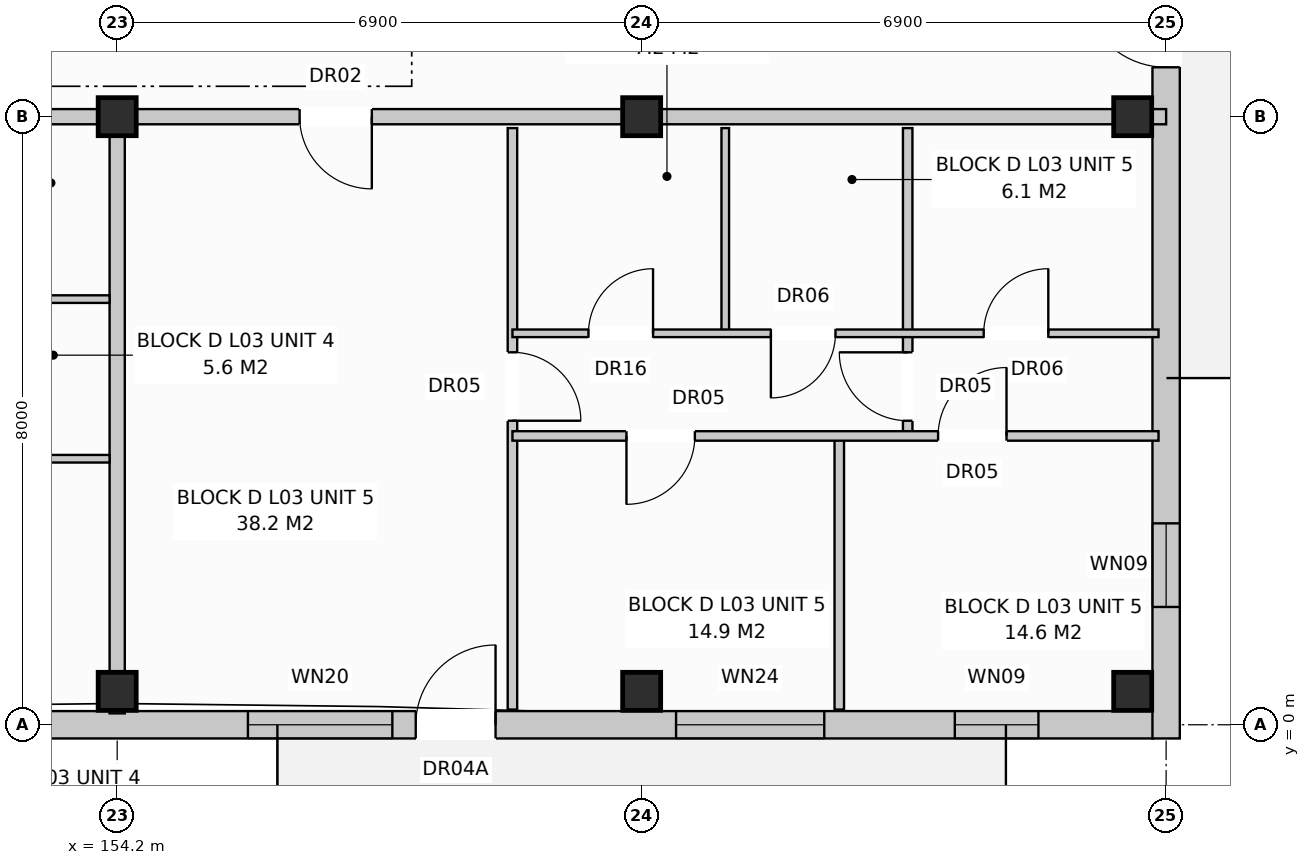
"""IFC4 building model, lengths in metres.
Left out: names, types, materials, properties, quantities, classifications, styles, units other than length and angle.
Written with IfcOpenShell. Run it as: python <this file> out.ifc"""

import sys

from ifc_helpers import new_model, si_unit, direction, frame, frame_2d, origin, origin_with_axes, origin_2d, place, context, subcontext, project, spatial, rectangle, extrude, element, fill, save


model = new_model("IFC4")
c1 = context("Model", 3, precision=1e-05, world=origin(), true_north=direction((0.0, 1.0)))
c2 = subcontext(c1, "Body", "Model", "MODEL_VIEW")
j1 = project(units=[si_unit("LENGTHUNIT", "METRE"), si_unit("PLANEANGLEUNIT", "RADIAN")], contexts=[c1])
p1 = place(None, origin())
s1 = spatial("IfcSite", under=j1, at=p1, CompositionType="ELEMENT")
p2 = place(p1, origin())
s2 = spatial("IfcBuilding", under=s1, at=p2, CompositionType="ELEMENT")
p3 = place(p2, frame((0.0, 0.0, 11.2)))
s3 = spatial("IfcBuildingStorey", under=s2, at=p3, CompositionType="ELEMENT", Elevation=11.2)
for number, where, z_axis, x_axis in (
    (1, (154.2, 0.44, 0.0), (0.0, 0.0, 1.0), (1.0, 0.0, 0.0)),
    (2, (154.2, 8.0, 0.0), (0.0, 0.0, 1.0), (1.0, 0.0, 0.0)),
    (3, (161.1, 0.44, 0.0), (0.0, 0.0, 1.0), (1.0, 0.0, 0.0)),
    (4, (161.1, 8.0, 0.0), (0.0, 0.0, 1.0), (1.0, 0.0, 0.0)),
    (5, (167.56, 0.44, 0.0), (0.0, 0.0, 1.0), (1.0, 0.0, 0.0)),
    (6, (167.56, 8.0, 0.0), (0.0, 0.0, 1.0), (1.0, 0.0, 0.0)),
):
    element("IfcColumn", number, at=place(p3, frame(where, z_axis=z_axis, x_axis=x_axis)), inside=s3, PredefinedType="COLUMN", context=c2, shape_type="SweptSolid", body=[
        extrude(rectangle(XDim=0.5, YDim=0.5, at=origin_2d()), origin(), (0.0, 0.0, 1.0), 3.2),
    ])
p4 = place(p3, frame((112.97, 0.0, 0.0), z_axis=(0.0, 0.0, 1.0), x_axis=(1.0, 0.0, 0.0)))
e7 = element("IfcWall", 7, at=p4, inside=s3, PredefinedType="STANDARD", context=c2, shape_type="SweptSolid", body=[
    extrude(rectangle(XDim=54.86, YDim=0.36, at=frame_2d((27.43, 0.0))), origin(), (0.0, 0.0, 1.0), 2.94),
])
p5 = place(p4, frame((3.764, 0.0, 0.0)))
e8 = element("IfcOpeningElement", 8, at=p5, cuts=e7, PredefinedType="OPENING", context=c2, shape_type="SweptSolid", body=[
    extrude(rectangle(XDim=1.05, YDim=2.12, at=frame_2d((0.525, 1.06))), frame((0.0, 0.192, 0.0), z_axis=(0.0, -1.0, 0.0), x_axis=(1.0, 0.0, 0.0)), (0.0, 0.0, 1.0), 0.384),
])
p6 = place(p4, frame((16.558, 0.0, 0.0)))
e9 = element("IfcOpeningElement", 9, at=p6, cuts=e7, PredefinedType="OPENING", context=c2, shape_type="SweptSolid", body=[
    extrude(rectangle(XDim=1.05, YDim=2.12, at=frame_2d((0.525, 1.06))), frame((0.0, 0.192, 0.0), z_axis=(0.0, -1.0, 0.0), x_axis=(1.0, 0.0, 0.0)), (0.0, 0.0, 1.0), 0.384),
])
p7 = place(p4, frame((30.058, 0.0, 0.0)))
e10 = element("IfcOpeningElement", 10, at=p7, cuts=e7, PredefinedType="OPENING", context=c2, shape_type="SweptSolid", body=[
    extrude(rectangle(XDim=1.05, YDim=2.12, at=frame_2d((0.525, 1.06))), frame((0.0, 0.192, 0.0), z_axis=(0.0, -1.0, 0.0), x_axis=(1.0, 0.0, 0.0)), (0.0, 0.0, 1.0), 0.384),
])
p8 = place(p4, frame((45.158, 0.0, 0.0)))
e11 = element("IfcOpeningElement", 11, at=p8, cuts=e7, PredefinedType="OPENING", context=c2, shape_type="SweptSolid", body=[
    extrude(rectangle(XDim=1.05, YDim=2.12, at=frame_2d((0.525, 1.06))), frame((0.0, 0.192, 0.0), z_axis=(0.0, -1.0, 0.0), x_axis=(1.0, 0.0, 0.0)), (0.0, 0.0, 1.0), 0.384),
])
p9 = place(p4, frame((1.6, 0.0, 0.8)))
e12 = element("IfcOpeningElement", 12, at=p9, cuts=e7, PredefinedType="OPENING", context=c2, shape_type="SweptSolid", body=[
    extrude(rectangle(XDim=1.8, YDim=1.7, at=frame_2d((0.9, 0.85))), frame((0.0, 0.192, 0.0), z_axis=(0.0, -1.0, 0.0), x_axis=(1.0, 0.0, 0.0)), (0.0, 0.0, 1.0), 0.384),
])
p10 = place(p4, frame((7.65, 0.0, 0.72)))
e13 = element("IfcOpeningElement", 13, at=p10, cuts=e7, PredefinedType="OPENING", context=c2, shape_type="SweptSolid", body=[
    extrude(rectangle(XDim=1.1, YDim=1.5, at=frame_2d((0.55, 0.75))), frame((0.0, 0.192, 0.0), z_axis=(0.0, -1.0, 0.0), x_axis=(1.0, 0.0, 0.0)), (0.0, 0.0, 1.0), 0.384),
])
p11 = place(p4, frame((10.425, 0.0, 0.8)))
e14 = element("IfcOpeningElement", 14, at=p11, cuts=e7, PredefinedType="OPENING", context=c2, shape_type="SweptSolid", body=[
    extrude(rectangle(XDim=1.95, YDim=1.65, at=frame_2d((0.975, 0.825))), frame((0.0, 0.192, 0.0), z_axis=(0.0, -1.0, 0.0), x_axis=(1.0, 0.0, 0.0)), (0.0, 0.0, 1.0), 0.384),
])
p12 = place(p4, frame((14.85, 0.0, 0.72)))
e15 = element("IfcOpeningElement", 15, at=p12, cuts=e7, PredefinedType="OPENING", context=c2, shape_type="SweptSolid", body=[
    extrude(rectangle(XDim=1.1, YDim=1.5, at=frame_2d((0.55, 0.75))), frame((0.0, 0.192, 0.0), z_axis=(0.0, -1.0, 0.0), x_axis=(1.0, 0.0, 0.0)), (0.0, 0.0, 1.0), 0.384),
])
p13 = place(p4, frame((18.15, 0.0, 0.72)))
e16 = element("IfcOpeningElement", 16, at=p13, cuts=e7, PredefinedType="OPENING", context=c2, shape_type="SweptSolid", body=[
    extrude(rectangle(XDim=1.9, YDim=1.85, at=frame_2d((0.95, 0.925))), frame((0.0, 0.192, 0.0), z_axis=(0.0, -1.0, 0.0), x_axis=(1.0, 0.0, 0.0)), (0.0, 0.0, 1.0), 0.384),
])
p14 = place(p4, frame((24.25, 0.0, 0.72)))
e17 = element("IfcOpeningElement", 17, at=p14, cuts=e7, PredefinedType="OPENING", context=c2, shape_type="SweptSolid", body=[
    extrude(rectangle(XDim=1.1, YDim=1.5, at=frame_2d((0.55, 0.75))), frame((0.0, 0.192, 0.0), z_axis=(0.0, -1.0, 0.0), x_axis=(1.0, 0.0, 0.0)), (0.0, 0.0, 1.0), 0.384),
])
p15 = place(p4, frame((28.35, 0.0, 0.72)))
e18 = element("IfcOpeningElement", 18, at=p15, cuts=e7, PredefinedType="OPENING", context=c2, shape_type="SweptSolid", body=[
    extrude(rectangle(XDim=1.1, YDim=1.5, at=frame_2d((0.55, 0.75))), frame((0.0, 0.192, 0.0), z_axis=(0.0, -1.0, 0.0), x_axis=(1.0, 0.0, 0.0)), (0.0, 0.0, 1.0), 0.384),
])
p16 = place(p4, frame((31.85, 0.0, 0.72)))
e19 = element("IfcOpeningElement", 19, at=p16, cuts=e7, PredefinedType="OPENING", context=c2, shape_type="SweptSolid", body=[
    extrude(rectangle(XDim=1.9, YDim=1.85, at=frame_2d((0.95, 0.925))), frame((0.0, 0.192, 0.0), z_axis=(0.0, -1.0, 0.0), x_axis=(1.0, 0.0, 0.0)), (0.0, 0.0, 1.0), 0.384),
])
p17 = place(p4, frame((35.325, 0.0, 0.8)))
e20 = element("IfcOpeningElement", 20, at=p17, cuts=e7, PredefinedType="OPENING", context=c2, shape_type="SweptSolid", body=[
    extrude(rectangle(XDim=1.95, YDim=1.65, at=frame_2d((0.975, 0.825))), frame((0.0, 0.192, 0.0), z_axis=(0.0, -1.0, 0.0), x_axis=(1.0, 0.0, 0.0)), (0.0, 0.0, 1.0), 0.384),
])
p18 = place(p4, frame((39.15, 0.0, 0.72)))
e21 = element("IfcOpeningElement", 21, at=p18, cuts=e7, PredefinedType="OPENING", context=c2, shape_type="SweptSolid", body=[
    extrude(rectangle(XDim=1.1, YDim=1.5, at=frame_2d((0.55, 0.75))), frame((0.0, 0.192, 0.0), z_axis=(0.0, -1.0, 0.0), x_axis=(1.0, 0.0, 0.0)), (0.0, 0.0, 1.0), 0.384),
])
p19 = place(p4, frame((42.95, 0.0, 0.8)))
e22 = element("IfcOpeningElement", 22, at=p19, cuts=e7, PredefinedType="OPENING", context=c2, shape_type="SweptSolid", body=[
    extrude(rectangle(XDim=1.9, YDim=1.85, at=frame_2d((0.95, 0.925))), frame((0.0, 0.192, 0.0), z_axis=(0.0, -1.0, 0.0), x_axis=(1.0, 0.0, 0.0)), (0.0, 0.0, 1.0), 0.384),
])
p20 = place(p4, frame((48.583, 0.0, 0.8)))
e23 = element("IfcOpeningElement", 23, at=p20, cuts=e7, PredefinedType="OPENING", context=c2, shape_type="SweptSolid", body=[
    extrude(rectangle(XDim=1.95, YDim=1.65, at=frame_2d((0.975, 0.825))), frame((0.0, 0.192, 0.0), z_axis=(0.0, -1.0, 0.0), x_axis=(1.0, 0.0, 0.0)), (0.0, 0.0, 1.0), 0.384),
])
p21 = place(p4, frame((52.25, 0.0, 0.72)))
e24 = element("IfcOpeningElement", 24, at=p21, cuts=e7, PredefinedType="OPENING", context=c2, shape_type="SweptSolid", body=[
    extrude(rectangle(XDim=1.1, YDim=1.5, at=frame_2d((0.55, 0.75))), frame((0.0, 0.192, 0.0), z_axis=(0.0, -1.0, 0.0), x_axis=(1.0, 0.0, 0.0)), (0.0, 0.0, 1.0), 0.384),
])
p22 = place(p3, frame((168.0, -0.18, 0.0), z_axis=(0.0, 0.0, 1.0), x_axis=(0.0, 1.0, 0.0)))
e25 = element("IfcWall", 25, at=p22, inside=s3, PredefinedType="STANDARD", context=c2, shape_type="SweptSolid", body=[
    extrude(rectangle(XDim=18.76, YDim=0.36, at=frame_2d((9.38, 0.0))), origin(), (0.0, 0.0, 1.0), 2.94),
])
p23 = place(p22, frame((8.83, 0.0, 0.0)))
e26 = element("IfcOpeningElement", 26, at=p23, cuts=e25, PredefinedType="OPENING", context=c2, shape_type="SweptSolid", body=[
    extrude(rectangle(XDim=1.1, YDim=2.1, at=frame_2d((0.55, 1.05))), frame((0.0, 0.192, 0.0), z_axis=(0.0, -1.0, 0.0), x_axis=(1.0, 0.0, 0.0)), (0.0, 0.0, 1.0), 0.384),
])
p24 = place(p22, frame((1.73, 0.0, 0.72)))
e27 = element("IfcOpeningElement", 27, at=p24, cuts=e25, PredefinedType="OPENING", context=c2, shape_type="SweptSolid", body=[
    extrude(rectangle(XDim=1.1, YDim=1.5, at=frame_2d((0.55, 0.75))), frame((0.0, 0.192, 0.0), z_axis=(0.0, -1.0, 0.0), x_axis=(1.0, 0.0, 0.0)), (0.0, 0.0, 1.0), 0.384),
])
p25 = place(p22, frame((15.93, 0.0, 0.72)))
e28 = element("IfcOpeningElement", 28, at=p25, cuts=e25, PredefinedType="OPENING", context=c2, shape_type="SweptSolid", body=[
    extrude(rectangle(XDim=1.1, YDim=1.5, at=frame_2d((0.55, 0.75))), frame((0.0, 0.192, 0.0), z_axis=(0.0, -1.0, 0.0), x_axis=(1.0, 0.0, 0.0)), (0.0, 0.0, 1.0), 0.384),
])
p26 = place(p3, frame((154.2, 7.85, 0.0), z_axis=(0.0, 0.0, 1.0), x_axis=(0.0, -1.0, 0.0)))
e29 = element("IfcWall", 29, at=p26, inside=s3, PredefinedType="PARTITIONING", context=c2, shape_type="SweptSolid", body=[
    extrude(rectangle(XDim=7.7, YDim=0.2, at=frame_2d((3.85, 0.0))), origin(), (0.0, 0.0, 1.0), 2.94),
])
p27 = place(p3, frame((147.3, 8.0, 0.0), z_axis=(0.0, 0.0, 1.0), x_axis=(1.0, 0.0, 0.0)))
e30 = element("IfcWall", 30, at=p27, inside=s3, PredefinedType="PARTITIONING", context=c2, shape_type="SweptSolid", body=[
    extrude(rectangle(XDim=6.9, YDim=0.2, at=frame_2d((3.45, 0.0))), origin(), (0.0, 0.0, 1.0), 2.38),
])
p28 = place(p27, frame((2.0, 0.0, 0.0)))
e31 = element("IfcOpeningElement", 31, at=p28, cuts=e30, PredefinedType="OPENING", context=c2, shape_type="SweptSolid", body=[
    extrude(rectangle(XDim=0.95, YDim=2.15, at=frame_2d((0.475, 1.075))), frame((0.0, 0.112, 0.0), z_axis=(0.0, -1.0, 0.0), x_axis=(1.0, 0.0, 0.0)), (0.0, 0.0, 1.0), 0.224),
])
for number, where, z_axis, x_axis in (
    (32, (151.2, 5.6, 0.0), (0.0, 0.0, 1.0), (1.0, 0.0, 0.0)),
    (33, (151.2, 3.5, 0.0), (0.0, 0.0, 1.0), (1.0, 0.0, 0.0)),
):
    element("IfcWall", number, at=place(p3, frame(where, z_axis=z_axis, x_axis=x_axis)), inside=s3, PredefinedType="PARTITIONING", context=c2, shape_type="SweptSolid", body=[
        extrude(rectangle(XDim=2.9, YDim=0.1, at=frame_2d((1.45, 0.0))), origin(), (0.0, 0.0, 1.0), 2.94),
    ])
p29 = place(p3, frame((154.2, 8.0, 0.0), z_axis=(0.0, 0.0, 1.0), x_axis=(1.0, 0.0, 0.0)))
e34 = element("IfcWall", 34, at=p29, inside=s3, PredefinedType="PARTITIONING", context=c2, shape_type="SweptSolid", body=[
    extrude(rectangle(XDim=13.8, YDim=0.2, at=frame_2d((6.9, 0.0))), origin(), (0.0, 0.0, 1.0), 2.38),
])
p30 = place(p29, frame((2.4, 0.0, 0.0)))
e35 = element("IfcOpeningElement", 35, at=p30, cuts=e34, PredefinedType="OPENING", context=c2, shape_type="SweptSolid", body=[
    extrude(rectangle(XDim=0.95, YDim=2.15, at=frame_2d((0.475, 1.075))), frame((0.0, 0.112, 0.0), z_axis=(0.0, -1.0, 0.0), x_axis=(1.0, 0.0, 0.0)), (0.0, 0.0, 1.0), 0.224),
])
p31 = place(p3, frame((159.4, 7.85, 0.0), z_axis=(0.0, 0.0, 1.0), x_axis=(0.0, -1.0, 0.0)))
e36 = element("IfcWall", 36, at=p31, inside=s3, PredefinedType="PARTITIONING", context=c2, shape_type="SweptSolid", body=[
    extrude(rectangle(XDim=7.65, YDim=0.125, at=frame_2d((3.825, 0.0))), origin(), (0.0, 0.0, 1.0), 2.94),
])
p32 = place(p31, frame((2.95, 0.0, 0.0)))
e37 = element("IfcOpeningElement", 37, at=p32, cuts=e36, PredefinedType="OPENING", context=c2, shape_type="SweptSolid", body=[
    extrude(rectangle(XDim=0.9, YDim=2.1, at=frame_2d((0.45, 1.05))), frame((0.0, 0.074, 0.0), z_axis=(0.0, -1.0, 0.0), x_axis=(1.0, 0.0, 0.0)), (0.0, 0.0, 1.0), 0.149),
])
p33 = place(p3, frame((162.2, 7.85, 0.0), z_axis=(0.0, 0.0, 1.0), x_axis=(0.0, -1.0, 0.0)))
e38 = element("IfcWall", 38, at=p33, inside=s3, PredefinedType="PARTITIONING", context=c2, shape_type="SweptSolid", body=[
    extrude(rectangle(XDim=2.7, YDim=0.1, at=frame_2d((1.35, 0.0))), origin(), (0.0, 0.0, 1.0), 2.94),
])
p34 = place(p3, frame((164.6, 7.85, 0.0), z_axis=(0.0, 0.0, 1.0), x_axis=(0.0, -1.0, 0.0)))
e39 = element("IfcWall", 39, at=p34, inside=s3, PredefinedType="PARTITIONING", context=c2, shape_type="SweptSolid", body=[
    extrude(rectangle(XDim=4.05, YDim=0.125, at=frame_2d((2.025, 0.0))), origin(), (0.0, 0.0, 1.0), 2.94),
])
p35 = place(p34, frame((2.95, 0.0, 0.0)))
e40 = element("IfcOpeningElement", 40, at=p35, cuts=e39, PredefinedType="OPENING", context=c2, shape_type="SweptSolid", body=[
    extrude(rectangle(XDim=0.9, YDim=2.1, at=frame_2d((0.45, 1.05))), frame((0.0, 0.074, 0.0), z_axis=(0.0, -1.0, 0.0), x_axis=(1.0, 0.0, 0.0)), (0.0, 0.0, 1.0), 0.149),
])
p36 = place(p3, frame((163.7, 3.8, 0.0), z_axis=(0.0, 0.0, 1.0), x_axis=(0.0, -1.0, 0.0)))
e41 = element("IfcWall", 41, at=p36, inside=s3, PredefinedType="PARTITIONING", context=c2, shape_type="SweptSolid", body=[
    extrude(rectangle(XDim=3.6, YDim=0.125, at=frame_2d((1.8, 0.0))), origin(), (0.0, 0.0, 1.0), 2.94),
])
p37 = place(p3, frame((159.4, 5.15, 0.0), z_axis=(0.0, 0.0, 1.0), x_axis=(1.0, 0.0, 0.0)))
e42 = element("IfcWall", 42, at=p37, inside=s3, PredefinedType="PARTITIONING", context=c2, shape_type="SweptSolid", body=[
    extrude(rectangle(XDim=8.5, YDim=0.1, at=frame_2d((4.25, 0.0))), origin(), (0.0, 0.0, 1.0), 2.94),
])
p38 = place(p37, frame((1.0, 0.0, 0.0)))
e43 = element("IfcOpeningElement", 43, at=p38, cuts=e42, PredefinedType="OPENING", context=c2, shape_type="SweptSolid", body=[
    extrude(rectangle(XDim=0.85, YDim=2.1, at=frame_2d((0.425, 1.05))), frame((0.0, 0.062, 0.0), z_axis=(0.0, -1.0, 0.0), x_axis=(1.0, 0.0, 0.0)), (0.0, 0.0, 1.0), 0.124),
])
p39 = place(p37, frame((3.4, 0.0, 0.0)))
e44 = element("IfcOpeningElement", 44, at=p39, cuts=e42, PredefinedType="OPENING", context=c2, shape_type="SweptSolid", body=[
    extrude(rectangle(XDim=0.85, YDim=2.05, at=frame_2d((0.425, 1.025))), frame((0.0, 0.062, 0.0), z_axis=(0.0, -1.0, 0.0), x_axis=(1.0, 0.0, 0.0)), (0.0, 0.0, 1.0), 0.124),
])
p40 = place(p37, frame((6.2, 0.0, 0.0)))
e45 = element("IfcOpeningElement", 45, at=p40, cuts=e42, PredefinedType="OPENING", context=c2, shape_type="SweptSolid", body=[
    extrude(rectangle(XDim=0.85, YDim=2.05, at=frame_2d((0.425, 1.025))), frame((0.0, 0.062, 0.0), z_axis=(0.0, -1.0, 0.0), x_axis=(1.0, 0.0, 0.0)), (0.0, 0.0, 1.0), 0.124),
])
p41 = place(p3, frame((159.4, 3.8, 0.0), z_axis=(0.0, 0.0, 1.0), x_axis=(1.0, 0.0, 0.0)))
e46 = element("IfcWall", 46, at=p41, inside=s3, PredefinedType="PARTITIONING", context=c2, shape_type="SweptSolid", body=[
    extrude(rectangle(XDim=8.5, YDim=0.125, at=frame_2d((4.25, 0.0))), origin(), (0.0, 0.0, 1.0), 2.94),
])
p42 = place(p41, frame((1.5, 0.0, 0.0)))
e47 = element("IfcOpeningElement", 47, at=p42, cuts=e46, PredefinedType="OPENING", context=c2, shape_type="SweptSolid", body=[
    extrude(rectangle(XDim=0.9, YDim=2.1, at=frame_2d((0.45, 1.05))), frame((0.0, 0.074, 0.0), z_axis=(0.0, -1.0, 0.0), x_axis=(1.0, 0.0, 0.0)), (0.0, 0.0, 1.0), 0.149),
])
p43 = place(p41, frame((5.6, 0.0, 0.0)))
e48 = element("IfcOpeningElement", 48, at=p43, cuts=e46, PredefinedType="OPENING", context=c2, shape_type="SweptSolid", body=[
    extrude(rectangle(XDim=0.9, YDim=2.1, at=frame_2d((0.45, 1.05))), frame((0.0, 0.074, 0.0), z_axis=(0.0, -1.0, 0.0), x_axis=(1.0, 0.0, 0.0)), (0.0, 0.0, 1.0), 0.149),
])
p44 = place(p8, origin_with_axes())
e49 = element("IfcDoor", 49, at=p44, inside=s3, OperationType="SINGLE_SWING_RIGHT", PredefinedType="DOOR", context=c2, shape_type="SweptSolid", body=[
    extrude(rectangle(XDim=1.05, YDim=2.12, at=frame_2d((0.525, 1.06))), frame((0.0, 0.025, 0.0), z_axis=(0.0, -1.0, 0.0), x_axis=(1.0, 0.0, 0.0)), (0.0, 0.0, 1.0), 0.05),
])
fill(e11, e49)
p45 = place(p19, origin_with_axes())
e50 = element("IfcWindow", 50, at=p45, inside=s3, PartitioningType="SINGLE_PANEL", PredefinedType="WINDOW", context=c2, shape_type="SweptSolid", body=[
    extrude(rectangle(XDim=1.9, YDim=1.85, at=frame_2d((0.95, 0.925))), frame((0.0, 0.03, 0.0), z_axis=(0.0, -1.0, 0.0), x_axis=(1.0, 0.0, 0.0)), (0.0, 0.0, 1.0), 0.06),
])
fill(e22, e50)
p46 = place(p20, origin_with_axes())
e51 = element("IfcWindow", 51, at=p46, inside=s3, PartitioningType="SINGLE_PANEL", PredefinedType="WINDOW", context=c2, shape_type="SweptSolid", body=[
    extrude(rectangle(XDim=1.95, YDim=1.65, at=frame_2d((0.975, 0.825))), frame((0.0, 0.03, 0.0), z_axis=(0.0, -1.0, 0.0), x_axis=(1.0, 0.0, 0.0)), (0.0, 0.0, 1.0), 0.06),
])
fill(e23, e51)
p47 = place(p21, origin_with_axes())
e52 = element("IfcWindow", 52, at=p47, inside=s3, PartitioningType="SINGLE_PANEL", PredefinedType="WINDOW", context=c2, shape_type="SweptSolid", body=[
    extrude(rectangle(XDim=1.1, YDim=1.5, at=frame_2d((0.55, 0.75))), frame((0.0, 0.03, 0.0), z_axis=(0.0, -1.0, 0.0), x_axis=(1.0, 0.0, 0.0)), (0.0, 0.0, 1.0), 0.06),
])
fill(e24, e52)
p48 = place(p23, origin_with_axes())
e53 = element("IfcDoor", 53, at=p48, inside=s3, OperationType="SINGLE_SWING_RIGHT", PredefinedType="DOOR", context=c2, shape_type="SweptSolid", body=[
    extrude(rectangle(XDim=1.1, YDim=2.1, at=frame_2d((0.55, 1.05))), frame((0.0, 0.025, 0.0), z_axis=(0.0, -1.0, 0.0), x_axis=(1.0, 0.0, 0.0)), (0.0, 0.0, 1.0), 0.05),
])
fill(e26, e53)
p49 = place(p24, origin_with_axes())
e54 = element("IfcWindow", 54, at=p49, inside=s3, PartitioningType="SINGLE_PANEL", PredefinedType="WINDOW", context=c2, shape_type="SweptSolid", body=[
    extrude(rectangle(XDim=1.1, YDim=1.5, at=frame_2d((0.55, 0.75))), frame((0.0, 0.03, 0.0), z_axis=(0.0, -1.0, 0.0), x_axis=(1.0, 0.0, 0.0)), (0.0, 0.0, 1.0), 0.06),
])
fill(e27, e54)
p50 = place(p30, frame((0.95, 0.0, 0.0), z_axis=(0.0, 0.0, 1.0), x_axis=(-1.0, 0.0, 0.0)))
e55 = element("IfcDoor", 55, at=p50, inside=s3, OperationType="SINGLE_SWING_RIGHT", PredefinedType="DOOR", context=c2, shape_type="SweptSolid", body=[
    extrude(rectangle(XDim=0.95, YDim=2.15, at=frame_2d((0.475, 1.075))), frame((0.0, 0.025, 0.0), z_axis=(0.0, -1.0, 0.0), x_axis=(1.0, 0.0, 0.0)), (0.0, 0.0, 1.0), 0.05),
])
fill(e35, e55)
p51 = place(p32, origin_with_axes())
e56 = element("IfcDoor", 56, at=p51, inside=s3, OperationType="SINGLE_SWING_RIGHT", PredefinedType="DOOR", context=c2, shape_type="SweptSolid", body=[
    extrude(rectangle(XDim=0.9, YDim=2.1, at=frame_2d((0.45, 1.05))), frame((0.0, 0.025, 0.0), z_axis=(0.0, -1.0, 0.0), x_axis=(1.0, 0.0, 0.0)), (0.0, 0.0, 1.0), 0.05),
])
fill(e37, e56)
p52 = place(p35, frame((0.9, 0.0, 0.0), z_axis=(0.0, 0.0, 1.0), x_axis=(-1.0, 0.0, 0.0)))
e57 = element("IfcDoor", 57, at=p52, inside=s3, OperationType="SINGLE_SWING_LEFT", PredefinedType="DOOR", context=c2, shape_type="SweptSolid", body=[
    extrude(rectangle(XDim=0.9, YDim=2.1, at=frame_2d((0.45, 1.05))), frame((0.0, 0.025, 0.0), z_axis=(0.0, -1.0, 0.0), x_axis=(1.0, 0.0, 0.0)), (0.0, 0.0, 1.0), 0.05),
])
fill(e40, e57)
p53 = place(p38, origin_with_axes())
e58 = element("IfcDoor", 58, at=p53, inside=s3, OperationType="SINGLE_SWING_RIGHT", PredefinedType="DOOR", context=c2, shape_type="SweptSolid", body=[
    extrude(rectangle(XDim=0.85, YDim=2.1, at=frame_2d((0.425, 1.05))), frame((0.0, 0.025, 0.0), z_axis=(0.0, -1.0, 0.0), x_axis=(1.0, 0.0, 0.0)), (0.0, 0.0, 1.0), 0.05),
])
fill(e43, e58)
p54 = place(p39, frame((0.85, 0.0, 0.0), z_axis=(0.0, 0.0, 1.0), x_axis=(-1.0, 0.0, 0.0)))
e59 = element("IfcDoor", 59, at=p54, inside=s3, OperationType="SINGLE_SWING_LEFT", PredefinedType="DOOR", context=c2, shape_type="SweptSolid", body=[
    extrude(rectangle(XDim=0.85, YDim=2.05, at=frame_2d((0.425, 1.025))), frame((0.0, 0.025, 0.0), z_axis=(0.0, -1.0, 0.0), x_axis=(1.0, 0.0, 0.0)), (0.0, 0.0, 1.0), 0.05),
])
fill(e44, e59)
p55 = place(p40, origin_with_axes())
e60 = element("IfcDoor", 60, at=p55, inside=s3, OperationType="SINGLE_SWING_RIGHT", PredefinedType="DOOR", context=c2, shape_type="SweptSolid", body=[
    extrude(rectangle(XDim=0.85, YDim=2.05, at=frame_2d((0.425, 1.025))), frame((0.0, 0.025, 0.0), z_axis=(0.0, -1.0, 0.0), x_axis=(1.0, 0.0, 0.0)), (0.0, 0.0, 1.0), 0.05),
])
fill(e45, e60)
p56 = place(p42, frame((0.9, 0.0, 0.0), z_axis=(0.0, 0.0, 1.0), x_axis=(-1.0, 0.0, 0.0)))
e61 = element("IfcDoor", 61, at=p56, inside=s3, OperationType="SINGLE_SWING_LEFT", PredefinedType="DOOR", context=c2, shape_type="SweptSolid", body=[
    extrude(rectangle(XDim=0.9, YDim=2.1, at=frame_2d((0.45, 1.05))), frame((0.0, 0.025, 0.0), z_axis=(0.0, -1.0, 0.0), x_axis=(1.0, 0.0, 0.0)), (0.0, 0.0, 1.0), 0.05),
])
fill(e47, e61)
p57 = place(p43, origin_with_axes())
e62 = element("IfcDoor", 62, at=p57, inside=s3, OperationType="SINGLE_SWING_RIGHT", PredefinedType="DOOR", context=c2, shape_type="SweptSolid", body=[
    extrude(rectangle(XDim=0.9, YDim=2.1, at=frame_2d((0.45, 1.05))), frame((0.0, 0.025, 0.0), z_axis=(0.0, -1.0, 0.0), x_axis=(1.0, 0.0, 0.0)), (0.0, 0.0, 1.0), 0.05),
])
fill(e48, e62)
save(model, sys.argv[1])
